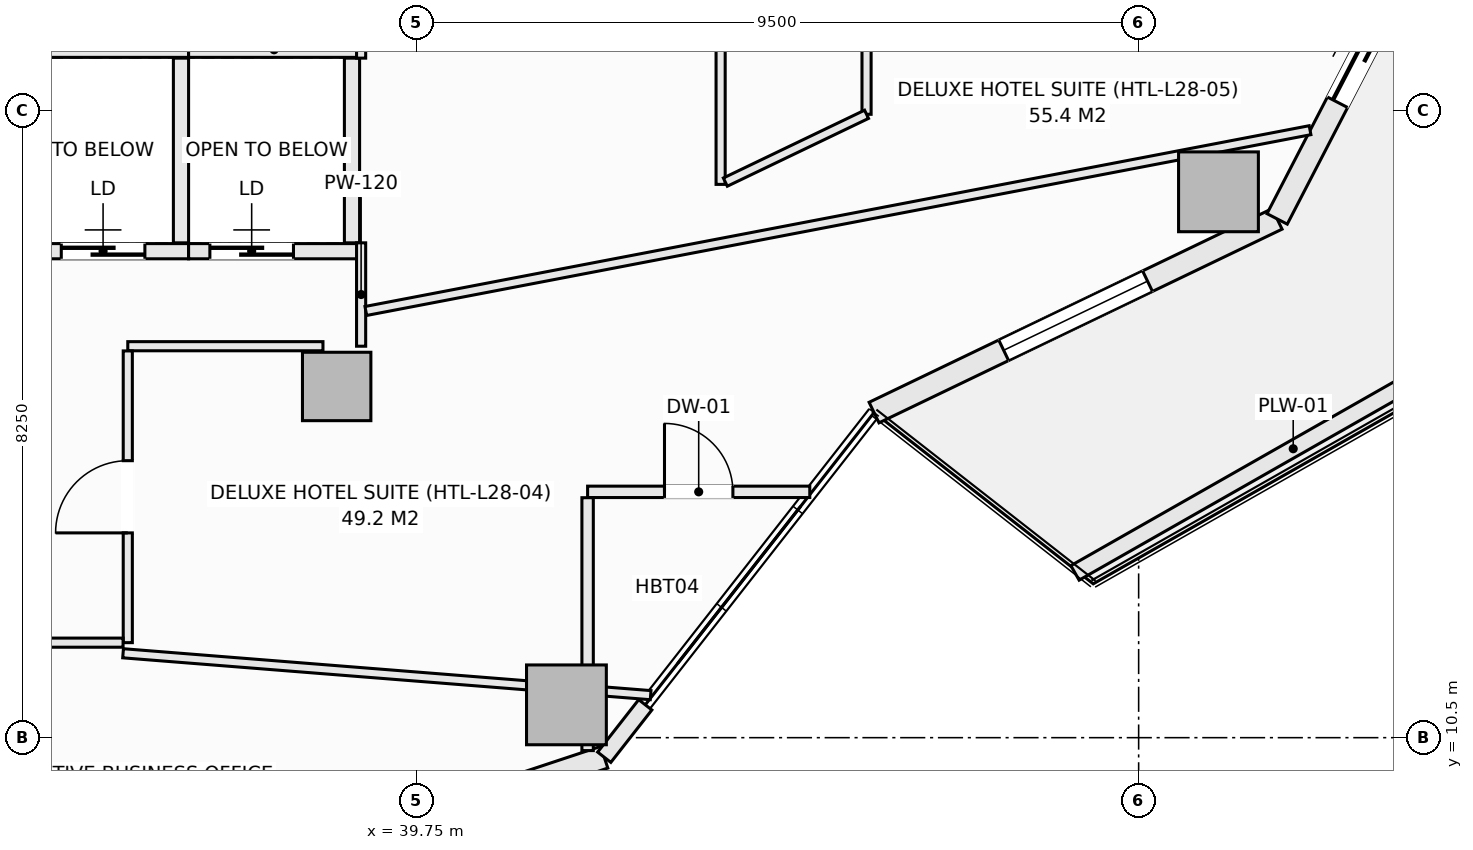
"""IFC4 building model, lengths in metres.
Left out: names, types, materials, properties, quantities, classifications, styles, units other than length and angle.
Written with IfcOpenShell. Run it as: python <this file> out.ifc"""

import sys

from ifc_helpers import new_model, si_unit, direction, frame, frame_2d, origin, origin_2d, place, context, subcontext, project, spatial, rectangle, extrude, element, fill, save


model = new_model("IFC4")
c1 = context("Model", 3, precision=1e-05, world=origin(), true_north=direction((0.0, 1.0)))
c2 = subcontext(c1, "Body", "Model", "MODEL_VIEW")
j1 = project(units=[si_unit("LENGTHUNIT", "METRE"), si_unit("PLANEANGLEUNIT", "RADIAN")], contexts=[c1])
p1 = place(None, origin())
s1 = spatial("IfcSite", under=j1, at=p1, CompositionType="ELEMENT")
p2 = place(p1, origin())
s2 = spatial("IfcBuilding", under=s1, at=p2, CompositionType="ELEMENT")
p3 = place(p2, frame((0.0, 0.0, 115.5)))
s3 = spatial("IfcBuildingStorey", under=s2, at=p3, CompositionType="ELEMENT", Elevation=115.5)
for number, where, z_axis, x_axis in (
    (1, (41.721, 10.932, -0.27), (0.0, 0.0, 1.0), (1.0, 0.0, 0.0)),
    (2, (50.3, 17.681, -0.27), (0.0, 0.0, 1.0), (1.0, 0.0, 0.0)),
):
    element("IfcColumn", number, at=place(p3, frame(where, z_axis=z_axis, x_axis=x_axis)), inside=s3, PredefinedType="COLUMN", context=c2, shape_type="SweptSolid", body=[
        extrude(rectangle(XDim=1.05, YDim=1.05, at=origin_2d()), origin(), (0.0, 0.0, 1.0), 3.4),
    ])
p4 = place(p3, frame((38.698, 15.121, -0.27), z_axis=(0.0, 0.0, 1.0), x_axis=(1.0, 0.0, 0.0)))
e3 = element("IfcColumn", 3, at=p4, inside=s3, PredefinedType="COLUMN", context=c2, shape_type="SweptSolid", body=[
    extrude(rectangle(XDim=0.9, YDim=0.9, at=origin_2d()), origin(), (0.0, 0.0, 1.0), 3.4),
])
p5 = place(p3, frame((36.385, 8.309, 0.0), z_axis=(0.0, 0.0, 1.0), x_axis=(0.949238009374, 0.314558741032, 0.0)))
e4 = element("IfcWall", 4, at=p5, inside=s3, PredefinedType="SOLIDWALL", context=c2, shape_type="SweptSolid", body=[
    extrude(rectangle(XDim=6.146, YDim=0.3, at=frame_2d((3.073, 0.0))), origin(), (0.0, 0.0, 1.0), 2.653),
])
p6 = place(p5, frame((2.023, 0.0, 0.74)))
e5 = element("IfcOpeningElement", 5, at=p6, cuts=e4, PredefinedType="OPENING", context=c2, shape_type="SweptSolid", body=[
    extrude(rectangle(XDim=2.1, YDim=1.7, at=frame_2d((1.05, 0.85))), frame((0.0, 0.16, 0.0), z_axis=(0.0, -1.0, 0.0), x_axis=(1.0, 0.0, 0.0)), (0.0, 0.0, 1.0), 0.32),
])
p7 = place(p3, frame((42.219, 10.242, 0.0), z_axis=(0.0, 0.0, 1.0), x_axis=(0.61650363284, 0.787352062736, 0.0)))
e6 = element("IfcWall", 6, at=p7, inside=s3, PredefinedType="SOLIDWALL", context=c2, shape_type="SweptSolid", body=[
    extrude(rectangle(XDim=0.876, YDim=0.22, at=frame_2d((0.438, 0.0))), origin(), (0.0, 0.0, 1.0), 2.653),
])
p8 = place(p3, frame((45.769, 14.777, 0.0), z_axis=(0.0, 0.0, 1.0), x_axis=(0.901370184739, 0.433049408339, 0.0)))
e7 = element("IfcWall", 7, at=p8, inside=s3, PredefinedType="SOLIDWALL", context=c2, shape_type="SweptSolid", body=[
    extrude(rectangle(XDim=5.884, YDim=0.3, at=frame_2d((2.942, 0.0))), origin(), (0.0, 0.0, 1.0), 2.653),
])
p9 = place(p8, frame((1.892, 0.0, 0.74)))
e8 = element("IfcOpeningElement", 8, at=p9, cuts=e7, PredefinedType="OPENING", context=c2, shape_type="SweptSolid", body=[
    extrude(rectangle(XDim=2.1, YDim=1.7, at=frame_2d((1.05, 0.85))), frame((0.0, 0.16, 0.0), z_axis=(0.0, -1.0, 0.0), x_axis=(1.0, 0.0, 0.0)), (0.0, 0.0, 1.0), 0.32),
])
p10 = place(p3, frame((51.072, 17.325, 0.0), z_axis=(0.0, 0.0, 1.0), x_axis=(0.459767899643, 0.888039119892, 0.0)))
e9 = element("IfcWall", 9, at=p10, inside=s3, PredefinedType="SOLIDWALL", context=c2, shape_type="SweptSolid", body=[
    extrude(rectangle(XDim=5.255, YDim=0.3, at=frame_2d((2.628, 0.0))), origin(), (0.0, 0.0, 1.0), 2.653),
])
p11 = place(p10, frame((1.728, 0.0, 0.0)))
e10 = element("IfcOpeningElement", 10, at=p11, cuts=e9, PredefinedType="OPENING", context=c2, shape_type="SweptSolid", body=[
    extrude(rectangle(XDim=1.8, YDim=2.25, at=frame_2d((0.9, 1.125))), frame((0.0, 0.16, 0.0), z_axis=(0.0, -1.0, 0.0), x_axis=(1.0, 0.0, 0.0)), (0.0, 0.0, 1.0), 0.32),
])
p12 = place(p3, frame((48.413, 12.668, 0.0), z_axis=(0.0, 0.0, 1.0), x_axis=(0.869187658335, 0.494482370361, 0.0)))
e11 = element("IfcWall", 11, at=p12, inside=s3, PredefinedType="PARAPET", context=c2, shape_type="SweptSolid", body=[
    extrude(rectangle(XDim=6.606, YDim=0.22, at=frame_2d((3.303, 0.0))), origin(), (0.0, 0.0, 1.0), 0.52),
])
p13 = place(p3, frame((34.5, 19.55, 0.0), z_axis=(0.0, 0.0, 1.0), x_axis=(1.0, 0.0, 0.0)))
e12 = element("IfcWall", 12, at=p13, inside=s3, PredefinedType="SOLIDWALL", context=c2, shape_type="SweptSolid", body=[
    extrude(rectangle(XDim=2.25, YDim=0.2, at=frame_2d((1.125, 0.0))), origin(), (0.0, 0.0, 1.0), 3.13),
])
p14 = place(p3, frame((34.5, 16.9, 0.0), z_axis=(0.0, 0.0, 1.0), x_axis=(1.0, 0.0, 0.0)))
e13 = element("IfcWall", 13, at=p14, inside=s3, PredefinedType="SOLIDWALL", context=c2, shape_type="SweptSolid", body=[
    extrude(rectangle(XDim=2.25, YDim=0.2, at=frame_2d((1.125, 0.0))), origin(), (0.0, 0.0, 1.0), 3.13),
])
p15 = place(p14, frame((0.575, 0.0, 0.0)))
e14 = element("IfcOpeningElement", 14, at=p15, cuts=e13, PredefinedType="OPENING", context=c2, shape_type="SweptSolid", body=[
    extrude(rectangle(XDim=1.1, YDim=2.2, at=frame_2d((0.55, 1.1))), frame((0.0, 0.11, 0.0), z_axis=(0.0, -1.0, 0.0), x_axis=(1.0, 0.0, 0.0)), (0.0, 0.0, 1.0), 0.22),
])
p16 = place(p3, frame((36.65, 17.01, 0.0), z_axis=(0.0, 0.0, 1.0), x_axis=(0.0, 1.0, 0.0)))
e15 = element("IfcWall", 15, at=p16, inside=s3, PredefinedType="SOLIDWALL", context=c2, shape_type="SweptSolid", body=[
    extrude(rectangle(XDim=2.43, YDim=0.2, at=frame_2d((1.215, 0.0))), origin(), (0.0, 0.0, 1.0), 3.13),
])
p17 = place(p3, frame((36.75, 19.55, 0.0), z_axis=(0.0, 0.0, 1.0), x_axis=(1.0, 0.0, 0.0)))
e16 = element("IfcWall", 16, at=p17, inside=s3, PredefinedType="SOLIDWALL", context=c2, shape_type="SweptSolid", body=[
    extrude(rectangle(XDim=2.25, YDim=0.2, at=frame_2d((1.125, 0.0))), origin(), (0.0, 0.0, 1.0), 3.13),
])
p18 = place(p3, frame((36.75, 16.9, 0.0), z_axis=(0.0, 0.0, 1.0), x_axis=(1.0, 0.0, 0.0)))
e17 = element("IfcWall", 17, at=p18, inside=s3, PredefinedType="SOLIDWALL", context=c2, shape_type="SweptSolid", body=[
    extrude(rectangle(XDim=2.25, YDim=0.2, at=frame_2d((1.125, 0.0))), origin(), (0.0, 0.0, 1.0), 3.13),
])
p19 = place(p18, frame((0.28, 0.0, 0.0)))
e18 = element("IfcOpeningElement", 18, at=p19, cuts=e17, PredefinedType="OPENING", context=c2, shape_type="SweptSolid", body=[
    extrude(rectangle(XDim=1.1, YDim=2.2, at=frame_2d((0.55, 1.1))), frame((0.0, 0.11, 0.0), z_axis=(0.0, -1.0, 0.0), x_axis=(1.0, 0.0, 0.0)), (0.0, 0.0, 1.0), 0.22),
])
p20 = place(p3, frame((38.9, 17.01, 0.0), z_axis=(0.0, 0.0, 1.0), x_axis=(0.0, 1.0, 0.0)))
e19 = element("IfcWall", 19, at=p20, inside=s3, PredefinedType="SOLIDWALL", context=c2, shape_type="SweptSolid", body=[
    extrude(rectangle(XDim=2.43, YDim=0.2, at=frame_2d((1.215, 0.0))), origin(), (0.0, 0.0, 1.0), 3.13),
])
p21 = place(p3, frame((39.02, 15.65, 0.0), z_axis=(0.0, 0.0, 1.0), x_axis=(0.0, 1.0, 0.0)))
e20 = element("IfcWall", 20, at=p21, inside=s3, PredefinedType="PARTITIONING", context=c2, shape_type="SweptSolid", body=[
    extrude(rectangle(XDim=1.36, YDim=0.12, at=frame_2d((0.68, 0.0))), origin(), (0.0, 0.0, 1.0), 2.505),
])
p22 = place(p3, frame((39.02, 19.44, 0.0), z_axis=(0.0, 0.0, 1.0), x_axis=(0.0, 1.0, 0.0)))
e21 = element("IfcWall", 21, at=p22, inside=s3, PredefinedType="PARTITIONING", context=c2, shape_type="SweptSolid", body=[
    extrude(rectangle(XDim=0.92, YDim=0.12, at=frame_2d((0.46, 0.0))), origin(), (0.0, 0.0, 1.0), 3.13),
])
p23 = place(p3, frame((35.95, 15.65, 0.0), z_axis=(0.0, 0.0, 1.0), x_axis=(1.0, 0.0, 0.0)))
e22 = element("IfcWall", 22, at=p23, inside=s3, PredefinedType="PARTITIONING", context=c2, shape_type="SweptSolid", body=[
    extrude(rectangle(XDim=2.568, YDim=0.12, at=frame_2d((1.284, 0.0))), origin(), (0.0, 0.0, 1.0), 3.13),
])
p24 = place(p3, frame((35.95, 11.75, 0.0), z_axis=(0.0, 0.0, 1.0), x_axis=(0.0, 1.0, 0.0)))
e23 = element("IfcWall", 23, at=p24, inside=s3, PredefinedType="PARTITIONING", context=c2, shape_type="SweptSolid", body=[
    extrude(rectangle(XDim=3.838, YDim=0.12, at=frame_2d((1.919, 0.0))), origin(), (0.0, 0.0, 1.0), 3.13),
])
p25 = place(p24, frame((1.444, 0.0, 0.0)))
e24 = element("IfcOpeningElement", 24, at=p25, cuts=e23, PredefinedType="OPENING", context=c2, shape_type="SweptSolid", body=[
    extrude(rectangle(XDim=0.95, YDim=2.1, at=frame_2d((0.475, 1.05))), frame((0.0, 0.07, 0.0), z_axis=(0.0, -1.0, 0.0), x_axis=(1.0, 0.0, 0.0)), (0.0, 0.0, 1.0), 0.14),
])
p26 = place(p3, frame((27.227, 11.75, 0.0), z_axis=(0.0, 0.0, 1.0), x_axis=(1.0, 0.0, 0.0)))
e25 = element("IfcWall", 25, at=p26, inside=s3, PredefinedType="PARTITIONING", context=c2, shape_type="SweptSolid", body=[
    extrude(rectangle(XDim=8.661, YDim=0.12, at=frame_2d((4.331, 0.0))), origin(), (0.0, 0.0, 1.0), 3.13),
])
p27 = place(p26, frame((1.593, 0.0, 0.0)))
e26 = element("IfcOpeningElement", 26, at=p27, cuts=e25, PredefinedType="OPENING", context=c2, shape_type="SweptSolid", body=[
    extrude(rectangle(XDim=0.95, YDim=2.1, at=frame_2d((0.475, 1.05))), frame((0.0, 0.07, 0.0), z_axis=(0.0, -1.0, 0.0), x_axis=(1.0, 0.0, 0.0)), (0.0, 0.0, 1.0), 0.14),
])
p28 = place(p26, frame((5.5, 0.0, 0.0)))
e27 = element("IfcOpeningElement", 27, at=p28, cuts=e25, PredefinedType="OPENING", context=c2, shape_type="SweptSolid", body=[
    extrude(rectangle(XDim=0.95, YDim=2.1, at=frame_2d((0.475, 1.05))), frame((0.0, 0.07, 0.0), z_axis=(0.0, -1.0, 0.0), x_axis=(1.0, 0.0, 0.0)), (0.0, 0.0, 1.0), 0.14),
])
p29 = place(p3, frame((43.75, 17.779, 0.0), z_axis=(0.0, 0.0, 1.0), x_axis=(0.0, 1.0, 0.0)))
e28 = element("IfcWall", 28, at=p29, inside=s3, PredefinedType="PARTITIONING", context=c2, shape_type="SweptSolid", body=[
    extrude(rectangle(XDim=5.241, YDim=0.12, at=frame_2d((2.621, 0.0))), origin(), (0.0, 0.0, 1.0), 3.13),
])
p30 = place(p29, frame((2.146, 0.0, 0.0)))
e29 = element("IfcOpeningElement", 29, at=p30, cuts=e28, PredefinedType="OPENING", context=c2, shape_type="SweptSolid", body=[
    extrude(rectangle(XDim=0.95, YDim=2.1, at=frame_2d((0.475, 1.05))), frame((0.0, 0.07, 0.0), z_axis=(0.0, -1.0, 0.0), x_axis=(1.0, 0.0, 0.0)), (0.0, 0.0, 1.0), 0.14),
])
p31 = place(p3, frame((45.67, 18.701, 0.0), z_axis=(0.0, 0.0, 1.0), x_axis=(0.0, 1.0, 0.0)))
e30 = element("IfcWall", 30, at=p31, inside=s3, PredefinedType="PARTITIONING", context=c2, shape_type="SweptSolid", body=[
    extrude(rectangle(XDim=8.747, YDim=0.12, at=frame_2d((4.374, 0.0))), origin(), (0.0, 0.0, 1.0), 3.13),
])
p32 = place(p3, frame((43.812, 17.809, 0.0), z_axis=(0.0, 0.0, 1.0), x_axis=(0.901467594949, 0.432846595525, 0.0)))
e31 = element("IfcWall", 31, at=p32, inside=s3, PredefinedType="PARTITIONING", context=c2, shape_type="SweptSolid", body=[
    extrude(rectangle(XDim=2.061, YDim=0.12, at=frame_2d((1.031, 0.0))), origin(), (0.0, 0.0, 1.0), 3.13),
])
p33 = place(p3, frame((39.082, 16.114, 0.0), z_axis=(0.0, 0.0, 1.0), x_axis=(0.982162094293, 0.188036221334, 0.0)))
e32 = element("IfcWall", 32, at=p33, inside=s3, PredefinedType="PARTITIONING", context=c2, shape_type="SweptSolid", body=[
    extrude(rectangle(XDim=12.649, YDim=0.12, at=frame_2d((6.324, 0.0))), origin(), (0.0, 0.0, 1.0), 2.702),
])
p34 = place(p3, frame((35.888, 11.61, 0.0), z_axis=(0.0, 0.0, 1.0), x_axis=(0.996863812192, -0.079136211323, 0.0)))
e33 = element("IfcWall", 33, at=p34, inside=s3, PredefinedType="PARTITIONING", context=c2, shape_type="SweptSolid", body=[
    extrude(rectangle(XDim=6.963, YDim=0.12, at=frame_2d((3.481, 0.0))), origin(), (0.0, 0.0, 1.0), 3.13),
])
p35 = place(p3, frame((42.0, 13.734, 0.0), z_axis=(0.0, 0.0, 1.0), x_axis=(1.0, 0.0, 0.0)))
e34 = element("IfcWall", 34, at=p35, inside=s3, PredefinedType="PARTITIONING", context=c2, shape_type="SweptSolid", body=[
    extrude(rectangle(XDim=2.923, YDim=0.15, at=frame_2d((1.461, 0.0))), origin(), (0.0, 0.0, 1.0), 3.13),
])
p36 = place(p35, frame((1.011, 0.0, 0.0)))
e35 = element("IfcOpeningElement", 35, at=p36, cuts=e34, PredefinedType="OPENING", context=c2, shape_type="SweptSolid", body=[
    extrude(rectangle(XDim=0.9, YDim=2.1, at=frame_2d((0.45, 1.05))), frame((0.0, 0.085, 0.0), z_axis=(0.0, -1.0, 0.0), x_axis=(1.0, 0.0, 0.0)), (0.0, 0.0, 1.0), 0.17),
])
p37 = place(p3, frame((42.0, 10.33, 0.0), z_axis=(0.0, 0.0, 1.0), x_axis=(0.0, 1.0, 0.0)))
e36 = element("IfcWall", 36, at=p37, inside=s3, PredefinedType="PARTITIONING", context=c2, shape_type="SweptSolid", body=[
    extrude(rectangle(XDim=0.733, YDim=0.15, at=frame_2d((0.366, 0.0))), origin(), (0.0, 0.0, 1.0), 3.13),
])
p38 = place(p3, frame((42.0, 11.187, 0.0), z_axis=(0.0, 0.0, 1.0), x_axis=(0.0, 1.0, 0.0)))
e37 = element("IfcWall", 37, at=p38, inside=s3, PredefinedType="PARTITIONING", context=c2, shape_type="SweptSolid", body=[
    extrude(rectangle(XDim=2.47, YDim=0.15, at=frame_2d((1.235, 0.0))), origin(), (0.0, 0.0, 1.0), 3.13),
])
p39 = place(p9, origin())
e38 = element("IfcWindow", 38, at=p39, inside=s3, PartitioningType="SINGLE_PANEL", PredefinedType="WINDOW", context=c2, shape_type="SweptSolid", body=[
    extrude(rectangle(XDim=2.1, YDim=1.7, at=frame_2d((1.05, 0.85))), frame((0.0, 0.03, 0.0), z_axis=(0.0, -1.0, 0.0), x_axis=(1.0, 0.0, 0.0)), (0.0, 0.0, 1.0), 0.06),
])
fill(e8, e38)
p40 = place(p11, frame((1.8, 0.0, 0.0), z_axis=(0.0, 0.0, 1.0), x_axis=(-1.0, 0.0, 0.0)))
e39 = element("IfcDoor", 39, at=p40, inside=s3, OperationType="SLIDING_TO_LEFT", PredefinedType="DOOR", context=c2, shape_type="SweptSolid", body=[
    extrude(rectangle(XDim=1.8, YDim=2.25, at=frame_2d((0.9, 1.125))), frame((0.0, 0.025, 0.0), z_axis=(0.0, -1.0, 0.0), x_axis=(1.0, 0.0, 0.0)), (0.0, 0.0, 1.0), 0.05),
])
fill(e10, e39)
p41 = place(p15, origin())
e40 = element("IfcDoor", 40, at=p41, inside=s3, OperationType="SLIDING_TO_LEFT", PredefinedType="DOOR", context=c2, shape_type="SweptSolid", body=[
    extrude(rectangle(XDim=1.1, YDim=2.2, at=frame_2d((0.55, 1.1))), frame((0.0, 0.025, 0.0), z_axis=(0.0, -1.0, 0.0), x_axis=(1.0, 0.0, 0.0)), (0.0, 0.0, 1.0), 0.05),
])
fill(e14, e40)
p42 = place(p19, origin())
e41 = element("IfcDoor", 41, at=p42, inside=s3, OperationType="SLIDING_TO_LEFT", PredefinedType="DOOR", context=c2, shape_type="SweptSolid", body=[
    extrude(rectangle(XDim=1.1, YDim=2.2, at=frame_2d((0.55, 1.1))), frame((0.0, 0.025, 0.0), z_axis=(0.0, -1.0, 0.0), x_axis=(1.0, 0.0, 0.0)), (0.0, 0.0, 1.0), 0.05),
])
fill(e18, e41)
p43 = place(p25, origin())
e42 = element("IfcDoor", 42, at=p43, inside=s3, OperationType="SINGLE_SWING_LEFT", PredefinedType="DOOR", context=c2, shape_type="SweptSolid", body=[
    extrude(rectangle(XDim=0.95, YDim=2.1, at=frame_2d((0.475, 1.05))), frame((0.0, 0.025, 0.0), z_axis=(0.0, -1.0, 0.0), x_axis=(1.0, 0.0, 0.0)), (0.0, 0.0, 1.0), 0.05),
])
fill(e24, e42)
p44 = place(p36, origin())
e43 = element("IfcDoor", 43, at=p44, inside=s3, OperationType="SINGLE_SWING_LEFT", PredefinedType="DOOR", context=c2, shape_type="SweptSolid", body=[
    extrude(rectangle(XDim=0.9, YDim=2.1, at=frame_2d((0.45, 1.05))), frame((0.0, 0.025, 0.0), z_axis=(0.0, -1.0, 0.0), x_axis=(1.0, 0.0, 0.0)), (0.0, 0.0, 1.0), 0.05),
])
fill(e35, e43)
save(model, sys.argv[1])
